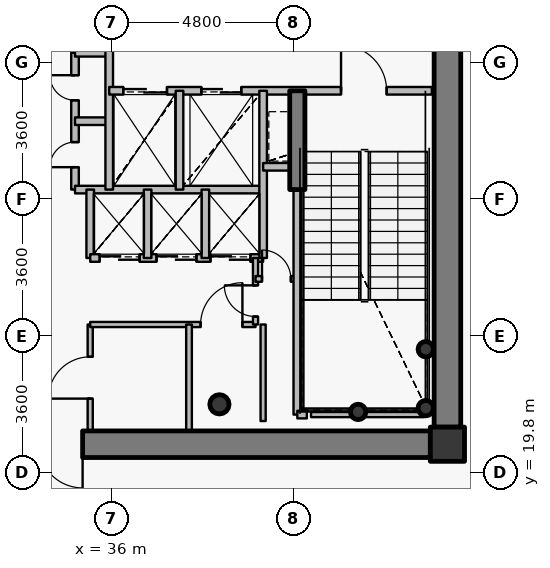
"""IFC4 building model, lengths in metres.
Left out: names, types, materials, properties, quantities, classifications, styles, units other than length and angle.
Written with IfcOpenShell. Run it as: python <this file> out.ifc"""

import sys

from ifc_helpers import new_model, si_unit, direction, frame, frame_2d, origin, origin_2d, place, context, subcontext, project, spatial, rectangle, hollow_circle, extrude, source, transform, mapped, element, fill, save


model = new_model("IFC4")
c1 = context("Model", 3, precision=1e-05, world=origin(), true_north=direction((0.0, 1.0)))
c2 = subcontext(c1, "Body", "Model", "MODEL_VIEW")
j1 = project(units=[si_unit("LENGTHUNIT", "METRE"), si_unit("PLANEANGLEUNIT", "RADIAN")], contexts=[c1])
p1 = place(None, origin())
s1 = spatial("IfcSite", under=j1, at=p1, CompositionType="ELEMENT")
p2 = place(p1, origin())
s2 = spatial("IfcBuilding", under=s1, at=p2, CompositionType="ELEMENT")
p3 = place(p2, frame((0.0, 0.0, 355.2)))
s3 = spatial("IfcBuildingStorey", under=s2, at=p3, CompositionType="ELEMENT", Elevation=355.2)
p4 = place(p3, frame((44.85, 20.55, 0.0), z_axis=(0.0, 0.0, 1.0), x_axis=(1.0, 0.0, 0.0)))
e1 = element("IfcColumn", 1, at=p4, inside=s3, PredefinedType="COLUMN", context=c2, shape_type="SweptSolid", body=[
    extrude(rectangle(XDim=0.9, YDim=0.9, at=origin_2d()), origin(), (0.0, 0.0, 1.0), 4.2),
])
p5 = place(p3, frame((38.85, 21.6, 0.0), z_axis=(0.0, 0.0, 1.0), x_axis=(1.0, 0.0, 0.0)))
e2 = element("IfcColumn", 2, at=p5, inside=s3, PredefinedType="COLUMN", context=c2, shape_type="SweptSolid", body=[
    extrude(hollow_circle(Radius=0.254, WallThickness=0.02, at=origin_2d()), origin(), (0.0, 0.0, 1.0), 4.2),
])
for number, where, z_axis, x_axis in (
    (3, (44.28, 21.5, 0.0), (0.0, 0.0, 1.0), (1.0, 0.0, 0.0)),
    (4, (44.28, 23.05, 0.0), (0.0, 0.0, 1.0), (1.0, 0.0, 0.0)),
    (5, (42.5, 21.4, 0.0), (0.0, 0.0, 1.0), (1.0, 0.0, 0.0)),
):
    element("IfcColumn", number, at=place(p3, frame(where, z_axis=z_axis, x_axis=x_axis)), inside=s3, PredefinedType="COLUMN", context=c2, shape_type="SweptSolid", body=[
        extrude(hollow_circle(Radius=0.203, WallThickness=0.016, at=origin_2d()), origin(), (0.0, 0.0, 1.0), 4.2),
    ])
p6 = place(p3, frame((44.85, 33.0, 0.0), z_axis=(0.0, 0.0, 1.0), x_axis=(0.0, -1.0, 0.0)))
e6 = element("IfcWall", 6, at=p6, inside=s3, PredefinedType="SHEAR", context=c2, shape_type="SweptSolid", body=[
    extrude(rectangle(XDim=12.0, YDim=0.7, at=frame_2d((6.0, 0.0))), origin(), (0.0, 0.0, 1.0), 3.5),
])
p7 = place(p3, frame((44.4, 20.55, 0.0), z_axis=(0.0, 0.0, 1.0), x_axis=(-1.0, 0.0, 0.0)))
e7 = element("IfcWall", 7, at=p7, inside=s3, PredefinedType="SHEAR", context=c2, shape_type="SweptSolid", body=[
    extrude(rectangle(XDim=16.8, YDim=0.7, at=frame_2d((8.4, 0.0))), origin(), (0.0, 0.0, 1.0), 3.5),
])
p8 = place(p7, frame((13.0, 0.0, 0.0)))
e8 = element("IfcOpeningElement", 8, at=p8, cuts=e7, PredefinedType="OPENING", context=c2, shape_type="SweptSolid", body=[
    extrude(rectangle(XDim=1.15, YDim=2.15, at=origin_2d()), frame((0.575, 0.36, 1.075), z_axis=(0.0, -1.0, 0.0), x_axis=(1.0, 0.0, 0.0)), (0.0, 0.0, 1.0), 0.72),
])
p9 = place(p7, frame((9.15, 0.0, 0.0)))
e9 = element("IfcOpeningElement", 9, at=p9, cuts=e7, PredefinedType="OPENING", context=c2, shape_type="SweptSolid", body=[
    extrude(rectangle(XDim=1.15, YDim=2.15, at=origin_2d()), frame((0.575, 0.36, 1.075), z_axis=(0.0, -1.0, 0.0), x_axis=(1.0, 0.0, 0.0)), (0.0, 0.0, 1.0), 0.72),
])
p10 = place(p3, frame((40.9, 27.25, 0.0), z_axis=(0.0, 0.0, 1.0), x_axis=(0.0, 1.0, 0.0)))
e10 = element("IfcWall", 10, at=p10, inside=s3, PredefinedType="SHEAR", context=c2, shape_type="SweptSolid", body=[
    extrude(rectangle(XDim=2.6, YDim=0.4, at=frame_2d((1.3, 0.0))), origin(), (0.0, 0.0, 1.0), 3.55),
])
p11 = place(p3, frame((35.05, 27.25, 0.0), z_axis=(0.0, 0.0, 1.0), x_axis=(0.0, 1.0, 0.0)))
e11 = element("IfcWall", 11, at=p11, inside=s3, PredefinedType="PARTITIONING", context=c2, shape_type="SweptSolid", body=[
    extrude(rectangle(XDim=3.6, YDim=0.2, at=frame_2d((1.8, 0.0))), origin(), (0.0, 0.0, 1.0), 3.95),
])
p12 = place(p11, frame((0.59, 0.0, 0.0)))
e12 = element("IfcOpeningElement", 12, at=p12, cuts=e11, PredefinedType="OPENING", context=c2, shape_type="SweptSolid", body=[
    extrude(rectangle(XDim=0.66, YDim=2.05, at=origin_2d()), frame((0.33, 0.11, 1.025), z_axis=(0.0, -1.0, 0.0), x_axis=(1.0, 0.0, 0.0)), (0.0, 0.0, 1.0), 0.22),
])
p13 = place(p11, frame((2.35, 0.0, 0.0)))
e13 = element("IfcOpeningElement", 13, at=p13, cuts=e11, PredefinedType="OPENING", context=c2, shape_type="SweptSolid", body=[
    extrude(rectangle(XDim=0.66, YDim=2.05, at=origin_2d()), frame((0.33, 0.11, 1.025), z_axis=(0.0, -1.0, 0.0), x_axis=(1.0, 0.0, 0.0)), (0.0, 0.0, 1.0), 0.22),
])
p14 = place(p3, frame((35.05, 27.25, 0.0), z_axis=(0.0, 0.0, 1.0), x_axis=(1.0, 0.0, 0.0)))
e14 = element("IfcWall", 14, at=p14, inside=s3, PredefinedType="PARTITIONING", context=c2, shape_type="SweptSolid", body=[
    extrude(rectangle(XDim=4.95, YDim=0.2, at=frame_2d((2.475, 0.0))), origin(), (0.0, 0.0, 1.0), 3.535),
])
for number, where, z_axis, x_axis in (
    (15, (35.05, 29.05, 0.0), (0.0, 0.0, 1.0), (1.0, 0.0, 0.0)),
    (16, (35.05, 30.85, 0.0), (0.0, 0.0, 1.0), (1.0, 0.0, 0.0)),
):
    element("IfcWall", number, at=place(p3, frame(where, z_axis=z_axis, x_axis=x_axis)), inside=s3, PredefinedType="PARTITIONING", context=c2, shape_type="SweptSolid", body=[
        extrude(rectangle(XDim=0.9, YDim=0.2, at=frame_2d((0.45, 0.0))), origin(), (0.0, 0.0, 1.0), 3.95),
    ])
p15 = place(p3, frame((35.45, 20.9, 0.0), z_axis=(0.0, 0.0, 1.0), x_axis=(0.0, 1.0, 0.0)))
e17 = element("IfcWall", 17, at=p15, inside=s3, PredefinedType="PARTITIONING", context=c2, shape_type="SweptSolid", body=[
    extrude(rectangle(XDim=2.8, YDim=0.135, at=frame_2d((1.4, 0.0))), origin(), (0.0, 0.0, 1.0), 3.535),
])
p16 = place(p15, frame((0.85, 0.0, 0.0)))
e18 = element("IfcOpeningElement", 18, at=p16, cuts=e17, PredefinedType="OPENING", context=c2, shape_type="SweptSolid", body=[
    extrude(rectangle(XDim=1.1, YDim=2.15, at=origin_2d()), frame((0.55, 0.078, 1.075), z_axis=(0.0, -1.0, 0.0), x_axis=(1.0, 0.0, 0.0)), (0.0, 0.0, 1.0), 0.155),
])
p17 = place(p3, frame((35.45, 23.7, 0.0), z_axis=(0.0, 0.0, 1.0), x_axis=(1.0, 0.0, 0.0)))
e19 = element("IfcWall", 19, at=p17, inside=s3, PredefinedType="PARTITIONING", context=c2, shape_type="SweptSolid", body=[
    extrude(rectangle(XDim=4.35, YDim=0.135, at=frame_2d((2.175, 0.0))), origin(), (0.0, 0.0, 1.0), 3.535),
])
p18 = place(p17, frame((2.905, 0.0, 0.0)))
e20 = element("IfcOpeningElement", 20, at=p18, cuts=e19, PredefinedType="OPENING", context=c2, shape_type="SweptSolid", body=[
    extrude(rectangle(XDim=1.1, YDim=2.15, at=origin_2d()), frame((0.55, 0.078, 1.075), z_axis=(0.0, -1.0, 0.0), x_axis=(1.0, 0.0, 0.0)), (0.0, 0.0, 1.0), 0.155),
])
p19 = place(p3, frame((35.45, 25.45, 0.0), z_axis=(0.0, 0.0, 1.0), x_axis=(0.0, 1.0, 0.0)))
e21 = element("IfcWall", 21, at=p19, inside=s3, PredefinedType="PARTITIONING", context=c2, shape_type="SweptSolid", body=[
    extrude(rectangle(XDim=1.8, YDim=0.2, at=frame_2d((0.9, 0.0))), origin(), (0.0, 0.0, 1.0), 3.95),
])
p20 = place(p3, frame((35.45, 25.45, 0.0), z_axis=(0.0, 0.0, 1.0), x_axis=(1.0, 0.0, 0.0)))
e22 = element("IfcWall", 22, at=p20, inside=s3, PredefinedType="PARTITIONING", context=c2, shape_type="SweptSolid", body=[
    extrude(rectangle(XDim=4.55, YDim=0.2, at=frame_2d((2.275, 0.0))), origin(), (0.0, 0.0, 1.0), 3.535),
])
p21 = place(p20, frame((0.25, 0.0, 0.0)))
e23 = element("IfcOpeningElement", 23, at=p21, cuts=e22, PredefinedType="OPENING", context=c2, shape_type="SweptSolid", body=[
    extrude(rectangle(XDim=1.05, YDim=2.15, at=origin_2d()), frame((0.525, 0.11, 1.075), z_axis=(0.0, -1.0, 0.0), x_axis=(1.0, 0.0, 0.0)), (0.0, 0.0, 1.0), 0.22),
])
p22 = place(p20, frame((1.745, 0.0, 0.0)))
e24 = element("IfcOpeningElement", 24, at=p22, cuts=e22, PredefinedType="OPENING", context=c2, shape_type="SweptSolid", body=[
    extrude(rectangle(XDim=1.05, YDim=2.15, at=origin_2d()), frame((0.525, 0.11, 1.075), z_axis=(0.0, -1.0, 0.0), x_axis=(1.0, 0.0, 0.0)), (0.0, 0.0, 1.0), 0.22),
])
p23 = place(p20, frame((3.165, 0.0, 0.0)))
e25 = element("IfcOpeningElement", 25, at=p23, cuts=e22, PredefinedType="OPENING", context=c2, shape_type="SweptSolid", body=[
    extrude(rectangle(XDim=1.05, YDim=2.15, at=origin_2d()), frame((0.525, 0.11, 1.075), z_axis=(0.0, -1.0, 0.0), x_axis=(1.0, 0.0, 0.0)), (0.0, 0.0, 1.0), 0.22),
])
p24 = place(p3, frame((35.95, 27.25, 0.0), z_axis=(0.0, 0.0, 1.0), x_axis=(0.0, 1.0, 0.0)))
e26 = element("IfcWall", 26, at=p24, inside=s3, PredefinedType="PARTITIONING", context=c2, shape_type="SweptSolid", body=[
    extrude(rectangle(XDim=3.8, YDim=0.2, at=frame_2d((1.9, 0.0))), origin(), (0.0, 0.0, 1.0), 3.95),
])
p25 = place(p3, frame((35.95, 29.85, 0.0), z_axis=(0.0, 0.0, 1.0), x_axis=(1.0, 0.0, 0.0)))
e27 = element("IfcWall", 27, at=p25, inside=s3, PredefinedType="PARTITIONING", context=c2, shape_type="SweptSolid", body=[
    extrude(rectangle(XDim=8.49, YDim=0.2, at=frame_2d((4.245, 0.0))), origin(), (0.0, 0.0, 1.0), 3.535),
])
p26 = place(p25, frame((6.1, 0.0, 0.0)))
e28 = element("IfcOpeningElement", 28, at=p26, cuts=e27, PredefinedType="OPENING", context=c2, shape_type="SweptSolid", body=[
    extrude(rectangle(XDim=1.2, YDim=2.15, at=origin_2d()), frame((0.6, 0.11, 1.075), z_axis=(0.0, -1.0, 0.0), x_axis=(1.0, 0.0, 0.0)), (0.0, 0.0, 1.0), 0.22),
])
p27 = place(p25, frame((0.37, 0.0, 0.0)))
e29 = element("IfcOpeningElement", 29, at=p27, cuts=e27, PredefinedType="OPENING", context=c2, shape_type="SweptSolid", body=[
    extrude(rectangle(XDim=1.15, YDim=2.15, at=origin_2d()), frame((0.575, 0.11, 1.075), z_axis=(0.0, -1.0, 0.0), x_axis=(1.0, 0.0, 0.0)), (0.0, 0.0, 1.0), 0.22),
])
p28 = place(p25, frame((2.425, 0.0, 0.0)))
e30 = element("IfcOpeningElement", 30, at=p28, cuts=e27, PredefinedType="OPENING", context=c2, shape_type="SweptSolid", body=[
    extrude(rectangle(XDim=1.05, YDim=2.15, at=origin_2d()), frame((0.525, 0.11, 1.075), z_axis=(0.0, -1.0, 0.0), x_axis=(1.0, 0.0, 0.0)), (0.0, 0.0, 1.0), 0.22),
])
p29 = place(p3, frame((36.96, 25.45, 0.0), z_axis=(0.0, 0.0, 1.0), x_axis=(0.0, 1.0, 0.0)))
e31 = element("IfcWall", 31, at=p29, inside=s3, PredefinedType="PARTITIONING", context=c2, shape_type="SweptSolid", body=[
    extrude(rectangle(XDim=1.8, YDim=0.2, at=frame_2d((0.9, 0.0))), origin(), (0.0, 0.0, 1.0), 3.95),
])
p30 = place(p3, frame((37.8, 27.25, 0.0), z_axis=(0.0, 0.0, 1.0), x_axis=(0.0, 1.0, 0.0)))
e32 = element("IfcWall", 32, at=p30, inside=s3, PredefinedType="PARTITIONING", context=c2, shape_type="SweptSolid", body=[
    extrude(rectangle(XDim=2.6, YDim=0.2, at=frame_2d((1.3, 0.0))), origin(), (0.0, 0.0, 1.0), 3.95),
])
p31 = place(p3, frame((38.05, 20.38, 0.0), z_axis=(0.0, 0.0, 1.0), x_axis=(0.0, 1.0, 0.0)))
e33 = element("IfcWall", 33, at=p31, inside=s3, PredefinedType="PARTITIONING", context=c2, shape_type="SweptSolid", body=[
    extrude(rectangle(XDim=3.32, YDim=0.15, at=frame_2d((1.66, 0.0))), origin(), (0.0, 0.0, 1.0), 3.485),
])
p32 = place(p3, frame((38.48, 25.45, 0.0), z_axis=(0.0, 0.0, 1.0), x_axis=(0.0, 1.0, 0.0)))
e34 = element("IfcWall", 34, at=p32, inside=s3, PredefinedType="PARTITIONING", context=c2, shape_type="SweptSolid", body=[
    extrude(rectangle(XDim=1.8, YDim=0.2, at=frame_2d((0.9, 0.0))), origin(), (0.0, 0.0, 1.0), 3.95),
])
p33 = place(p3, frame((39.8, 23.7, 0.0), z_axis=(0.0, 0.0, 1.0), x_axis=(0.0, 1.0, 0.0)))
e35 = element("IfcWall", 35, at=p33, inside=s3, PredefinedType="PARTITIONING", context=c2, shape_type="SweptSolid", body=[
    extrude(rectangle(XDim=1.75, YDim=0.135, at=frame_2d((0.875, 0.0))), origin(), (0.0, 0.0, 1.0), 3.95),
])
p34 = place(p33, frame((0.21, 0.0, 0.0)))
e36 = element("IfcOpeningElement", 36, at=p34, cuts=e35, PredefinedType="OPENING", context=c2, shape_type="SweptSolid", body=[
    extrude(rectangle(XDim=0.82, YDim=2.1, at=origin_2d()), frame((0.41, 0.078, 1.05), z_axis=(0.0, -1.0, 0.0), x_axis=(1.0, 0.0, 0.0)), (0.0, 0.0, 1.0), 0.155),
])
p35 = place(p3, frame((39.8, 24.9, 0.0), z_axis=(0.0, 0.0, 1.0), x_axis=(1.0, 0.0, 0.0)))
e37 = element("IfcWall", 37, at=p35, inside=s3, PredefinedType="PARTITIONING", context=c2, shape_type="SweptSolid", body=[
    extrude(rectangle(XDim=1.1, YDim=0.15, at=frame_2d((0.55, 0.0))), origin(), (0.0, 0.0, 1.0), 3.95),
])
p36 = place(p35, frame((0.17, 0.0, 0.0)))
e38 = element("IfcOpeningElement", 38, at=p36, cuts=e37, PredefinedType="OPENING", context=c2, shape_type="SweptSolid", body=[
    extrude(rectangle(XDim=0.76, YDim=2.1, at=origin_2d()), frame((0.38, 0.085, 1.05), z_axis=(0.0, -1.0, 0.0), x_axis=(1.0, 0.0, 0.0)), (0.0, 0.0, 1.0), 0.17),
])
p37 = place(p3, frame((40.0, 25.45, 0.0), z_axis=(0.0, 0.0, 1.0), x_axis=(0.0, 1.0, 0.0)))
e39 = element("IfcWall", 39, at=p37, inside=s3, PredefinedType="PARTITIONING", context=c2, shape_type="SweptSolid", body=[
    extrude(rectangle(XDim=4.4, YDim=0.2, at=frame_2d((2.2, 0.0))), origin(), (0.0, 0.0, 1.0), 3.95),
])
p38 = place(p3, frame((40.0, 27.85, 0.0), z_axis=(0.0, 0.0, 1.0), x_axis=(1.0, 0.0, 0.0)))
e40 = element("IfcWall", 40, at=p38, inside=s3, PredefinedType="PARTITIONING", context=c2, shape_type="SweptSolid", body=[
    extrude(rectangle(XDim=0.9, YDim=0.2, at=frame_2d((0.45, 0.0))), origin(), (0.0, 0.0, 1.0), 3.95),
])
p39 = place(p3, frame((40.9, 21.33, 0.0), z_axis=(0.0, 0.0, 1.0), x_axis=(0.0, 1.0, 0.0)))
e41 = element("IfcWall", 41, at=p39, inside=s3, PredefinedType="PARTITIONING", context=c2, shape_type="SweptSolid", body=[
    extrude(rectangle(XDim=5.91, YDim=0.2, at=frame_2d((2.955, 0.0))), origin(), (0.0, 0.0, 1.0), 3.485),
])
p40 = place(p3, frame((40.9, 21.33, 0.0), z_axis=(0.0, 0.0, 1.0), x_axis=(1.0, 0.0, 0.0)))
e42 = element("IfcWall", 42, at=p40, inside=s3, PredefinedType="PARTITIONING", context=c2, shape_type="SweptSolid", body=[
    extrude(rectangle(XDim=0.25, YDim=0.2, at=frame_2d((0.125, 0.0))), origin(), (0.0, 0.0, 1.0), 3.485),
])
p41 = place(p3, frame((44.24, 21.33, 0.0), z_axis=(0.0, 0.0, 1.0), x_axis=(-1.0, 0.0, 0.0)))
e43 = element("IfcWall", 43, at=p41, inside=s3, PredefinedType="PARTITIONING", context=c2, shape_type="SweptSolid", body=[
    extrude(rectangle(XDim=2.98, YDim=0.135, at=frame_2d((1.49, 0.0))), origin(), (0.0, 0.0, 1.0), 3.485),
])
p42 = place(p3, frame((40.0, 23.7, 0.0), z_axis=(0.0, 0.0, 1.0), x_axis=(0.0, -1.0, 0.0)))
e44 = element("IfcWall", 44, at=p42, inside=s3, PredefinedType="PARTITIONING", context=c2, shape_type="SweptSolid", body=[
    extrude(rectangle(XDim=2.54, YDim=0.135, at=frame_2d((1.27, 0.0))), origin(), (0.0, 0.0, 1.0), 3.485),
])
p43 = place(p3, frame((44.41, 20.2, 0.0), z_axis=(0.0, 0.0, 1.0), x_axis=(1.0, 0.0, 0.0)))
e45 = element("IfcWall", 45, at=p43, inside=s3, PredefinedType="PARTITIONING", context=c2, shape_type="SweptSolid", body=[
    extrude(rectangle(XDim=0.79, YDim=0.135, at=frame_2d((0.395, 0.0))), origin(), (0.0, 0.0, 1.0), 3.485),
])
p44 = place(p3, frame((45.2, 20.508, 0.0), z_axis=(0.0, 0.0, 1.0), x_axis=(0.0, 1.0, 0.0)))
e46 = element("IfcWall", 46, at=p44, inside=s3, PredefinedType="PARTITIONING", context=c2, shape_type="SweptSolid", body=[
    extrude(rectangle(XDim=0.482, YDim=0.135, at=frame_2d((0.241, 0.0))), origin(), (0.0, 0.0, 1.0), 3.95),
])
m1 = source(origin(), c2, "Body", "SweptSolid", [
    extrude(rectangle(XDim=1.15, YDim=2.15, at=origin_2d()), frame((0.575, 0.025, 1.075), z_axis=(0.0, -1.0, 0.0), x_axis=(1.0, 0.0, 0.0)), (0.0, 0.0, 1.0), 0.05),
])
p45 = place(p9, origin())
e47 = element("IfcDoor", 47, at=p45, inside=s3, OperationType="SINGLE_SWING_LEFT", PredefinedType="DOOR", context=c2, shape_type="MappedRepresentation", body=[
    mapped(m1, transform((0.0, 0.0, 0.0), x_axis=(1.0, 0.0, 0.0), y_axis=(0.0, 1.0, 0.0), z_axis=(0.0, 0.0, 1.0), scale=1.0)),
])
fill(e9, e47)
m2 = source(origin(), c2, "Body", "SweptSolid", [
    extrude(rectangle(XDim=1.2, YDim=2.15, at=origin_2d()), frame((0.6, 0.025, 1.075), z_axis=(0.0, -1.0, 0.0), x_axis=(1.0, 0.0, 0.0)), (0.0, 0.0, 1.0), 0.05),
])
p46 = place(p26, origin())
e48 = element("IfcDoor", 48, at=p46, inside=s3, OperationType="SINGLE_SWING_LEFT", PredefinedType="DOOR", context=c2, shape_type="MappedRepresentation", body=[
    mapped(m2, transform((0.0, 0.0, 0.0), x_axis=(1.0, 0.0, 0.0), y_axis=(0.0, 1.0, 0.0), z_axis=(0.0, 0.0, 1.0), scale=1.0)),
])
fill(e28, e48)
m3 = source(origin(), c2, "Body", "SweptSolid", [
    extrude(rectangle(XDim=1.15, YDim=2.15, at=origin_2d()), frame((0.575, 0.025, 1.075), z_axis=(0.0, -1.0, 0.0), x_axis=(1.0, 0.0, 0.0)), (0.0, 0.0, 1.0), 0.05),
])
p47 = place(p27, origin())
e49 = element("IfcDoor", 49, at=p47, inside=s3, OperationType="DOUBLE_DOOR_SLIDING", PredefinedType="USERDEFINED", context=c2, shape_type="MappedRepresentation", body=[
    mapped(m3, transform((0.0, 0.0, 0.0), x_axis=(1.0, 0.0, 0.0), y_axis=(0.0, 1.0, 0.0), z_axis=(0.0, 0.0, 1.0), scale=1.0)),
])
fill(e29, e49)
m4 = source(origin(), c2, "Body", "SweptSolid", [
    extrude(rectangle(XDim=1.05, YDim=2.15, at=origin_2d()), frame((0.525, 0.025, 1.075), z_axis=(0.0, -1.0, 0.0), x_axis=(1.0, 0.0, 0.0)), (0.0, 0.0, 1.0), 0.05),
])
p48 = place(p28, origin())
e50 = element("IfcDoor", 50, at=p48, inside=s3, OperationType="DOUBLE_DOOR_SLIDING", PredefinedType="USERDEFINED", context=c2, shape_type="MappedRepresentation", body=[
    mapped(m4, transform((0.0, 0.0, 0.0), x_axis=(1.0, 0.0, 0.0), y_axis=(0.0, 1.0, 0.0), z_axis=(0.0, 0.0, 1.0), scale=1.0)),
])
fill(e30, e50)
p49 = place(p21, origin())
e51 = element("IfcDoor", 51, at=p49, inside=s3, OperationType="DOUBLE_DOOR_SLIDING", PredefinedType="USERDEFINED", context=c2, shape_type="MappedRepresentation", body=[
    mapped(m4, transform((0.0, 0.0, 0.0), x_axis=(1.0, 0.0, 0.0), y_axis=(0.0, 1.0, 0.0), z_axis=(0.0, 0.0, 1.0), scale=1.0)),
])
fill(e23, e51)
p50 = place(p22, origin())
e52 = element("IfcDoor", 52, at=p50, inside=s3, OperationType="DOUBLE_DOOR_SLIDING", PredefinedType="USERDEFINED", context=c2, shape_type="MappedRepresentation", body=[
    mapped(m4, transform((0.0, 0.0, 0.0), x_axis=(1.0, 0.0, 0.0), y_axis=(0.0, 1.0, 0.0), z_axis=(0.0, 0.0, 1.0), scale=1.0)),
])
fill(e24, e52)
p51 = place(p23, origin())
e53 = element("IfcDoor", 53, at=p51, inside=s3, OperationType="DOUBLE_DOOR_SLIDING", PredefinedType="USERDEFINED", context=c2, shape_type="MappedRepresentation", body=[
    mapped(m4, transform((0.0, 0.0, 0.0), x_axis=(1.0, 0.0, 0.0), y_axis=(0.0, 1.0, 0.0), z_axis=(0.0, 0.0, 1.0), scale=1.0)),
])
fill(e25, e53)
m5 = source(origin(), c2, "Body", "SweptSolid", [
    extrude(rectangle(XDim=0.66, YDim=2.05, at=origin_2d()), frame((0.33, 0.025, 1.025), z_axis=(0.0, -1.0, 0.0), x_axis=(1.0, 0.0, 0.0)), (0.0, 0.0, 1.0), 0.05),
])
p52 = place(p12, origin())
e54 = element("IfcDoor", 54, at=p52, inside=s3, OperationType="SINGLE_SWING_LEFT", PredefinedType="USERDEFINED", context=c2, shape_type="MappedRepresentation", body=[
    mapped(m5, transform((0.0, 0.0, 0.0), x_axis=(1.0, 0.0, 0.0), y_axis=(0.0, 1.0, 0.0), z_axis=(0.0, 0.0, 1.0), scale=1.0)),
])
fill(e12, e54)
p53 = place(p13, origin())
e55 = element("IfcDoor", 55, at=p53, inside=s3, OperationType="SINGLE_SWING_RIGHT", PredefinedType="USERDEFINED", context=c2, shape_type="MappedRepresentation", body=[
    mapped(m5, transform((0.0, 0.0, 0.0), x_axis=(1.0, 0.0, 0.0), y_axis=(0.0, 1.0, 0.0), z_axis=(0.0, 0.0, 1.0), scale=1.0)),
])
fill(e13, e55)
m6 = source(origin(), c2, "Body", "SweptSolid", [
    extrude(rectangle(XDim=1.1, YDim=2.15, at=origin_2d()), frame((0.55, 0.025, 1.075), z_axis=(0.0, -1.0, 0.0), x_axis=(1.0, 0.0, 0.0)), (0.0, 0.0, 1.0), 0.05),
])
p54 = place(p16, origin())
e56 = element("IfcDoor", 56, at=p54, inside=s3, OperationType="SINGLE_SWING_LEFT", PredefinedType="DOOR", context=c2, shape_type="MappedRepresentation", body=[
    mapped(m6, transform((0.0, 0.0, 0.0), x_axis=(1.0, 0.0, 0.0), y_axis=(0.0, 1.0, 0.0), z_axis=(0.0, 0.0, 1.0), scale=1.0)),
])
fill(e18, e56)
p55 = place(p18, origin())
e57 = element("IfcDoor", 57, at=p55, inside=s3, OperationType="SINGLE_SWING_RIGHT", PredefinedType="DOOR", context=c2, shape_type="MappedRepresentation", body=[
    mapped(m6, transform((0.0, 0.0, 0.0), x_axis=(1.0, 0.0, 0.0), y_axis=(0.0, 1.0, 0.0), z_axis=(0.0, 0.0, 1.0), scale=1.0)),
])
fill(e20, e57)
m7 = source(origin(), c2, "Body", "SweptSolid", [
    extrude(rectangle(XDim=0.82, YDim=2.1, at=origin_2d()), frame((0.41, 0.025, 1.05), z_axis=(0.0, -1.0, 0.0), x_axis=(1.0, 0.0, 0.0)), (0.0, 0.0, 1.0), 0.05),
])
p56 = place(p34, origin())
e58 = element("IfcDoor", 58, at=p56, inside=s3, OperationType="SINGLE_SWING_RIGHT", PredefinedType="DOOR", context=c2, shape_type="MappedRepresentation", body=[
    mapped(m7, transform((0.0, 0.0, 0.0), x_axis=(1.0, 0.0, 0.0), y_axis=(0.0, 1.0, 0.0), z_axis=(0.0, 0.0, 1.0), scale=1.0)),
])
fill(e36, e58)
m8 = source(origin(), c2, "Body", "SweptSolid", [
    extrude(rectangle(XDim=0.76, YDim=2.1, at=origin_2d()), frame((0.38, 0.025, 1.05), z_axis=(0.0, -1.0, 0.0), x_axis=(1.0, 0.0, 0.0)), (0.0, 0.0, 1.0), 0.05),
])
p57 = place(p36, origin())
e59 = element("IfcDoor", 59, at=p57, inside=s3, OperationType="SINGLE_SWING_LEFT", PredefinedType="DOOR", context=c2, shape_type="MappedRepresentation", body=[
    mapped(m8, transform((0.0, 0.0, 0.0), x_axis=(1.0, 0.0, 0.0), y_axis=(0.0, 1.0, 0.0), z_axis=(0.0, 0.0, 1.0), scale=1.0)),
])
fill(e38, e59)
save(model, sys.argv[1])
